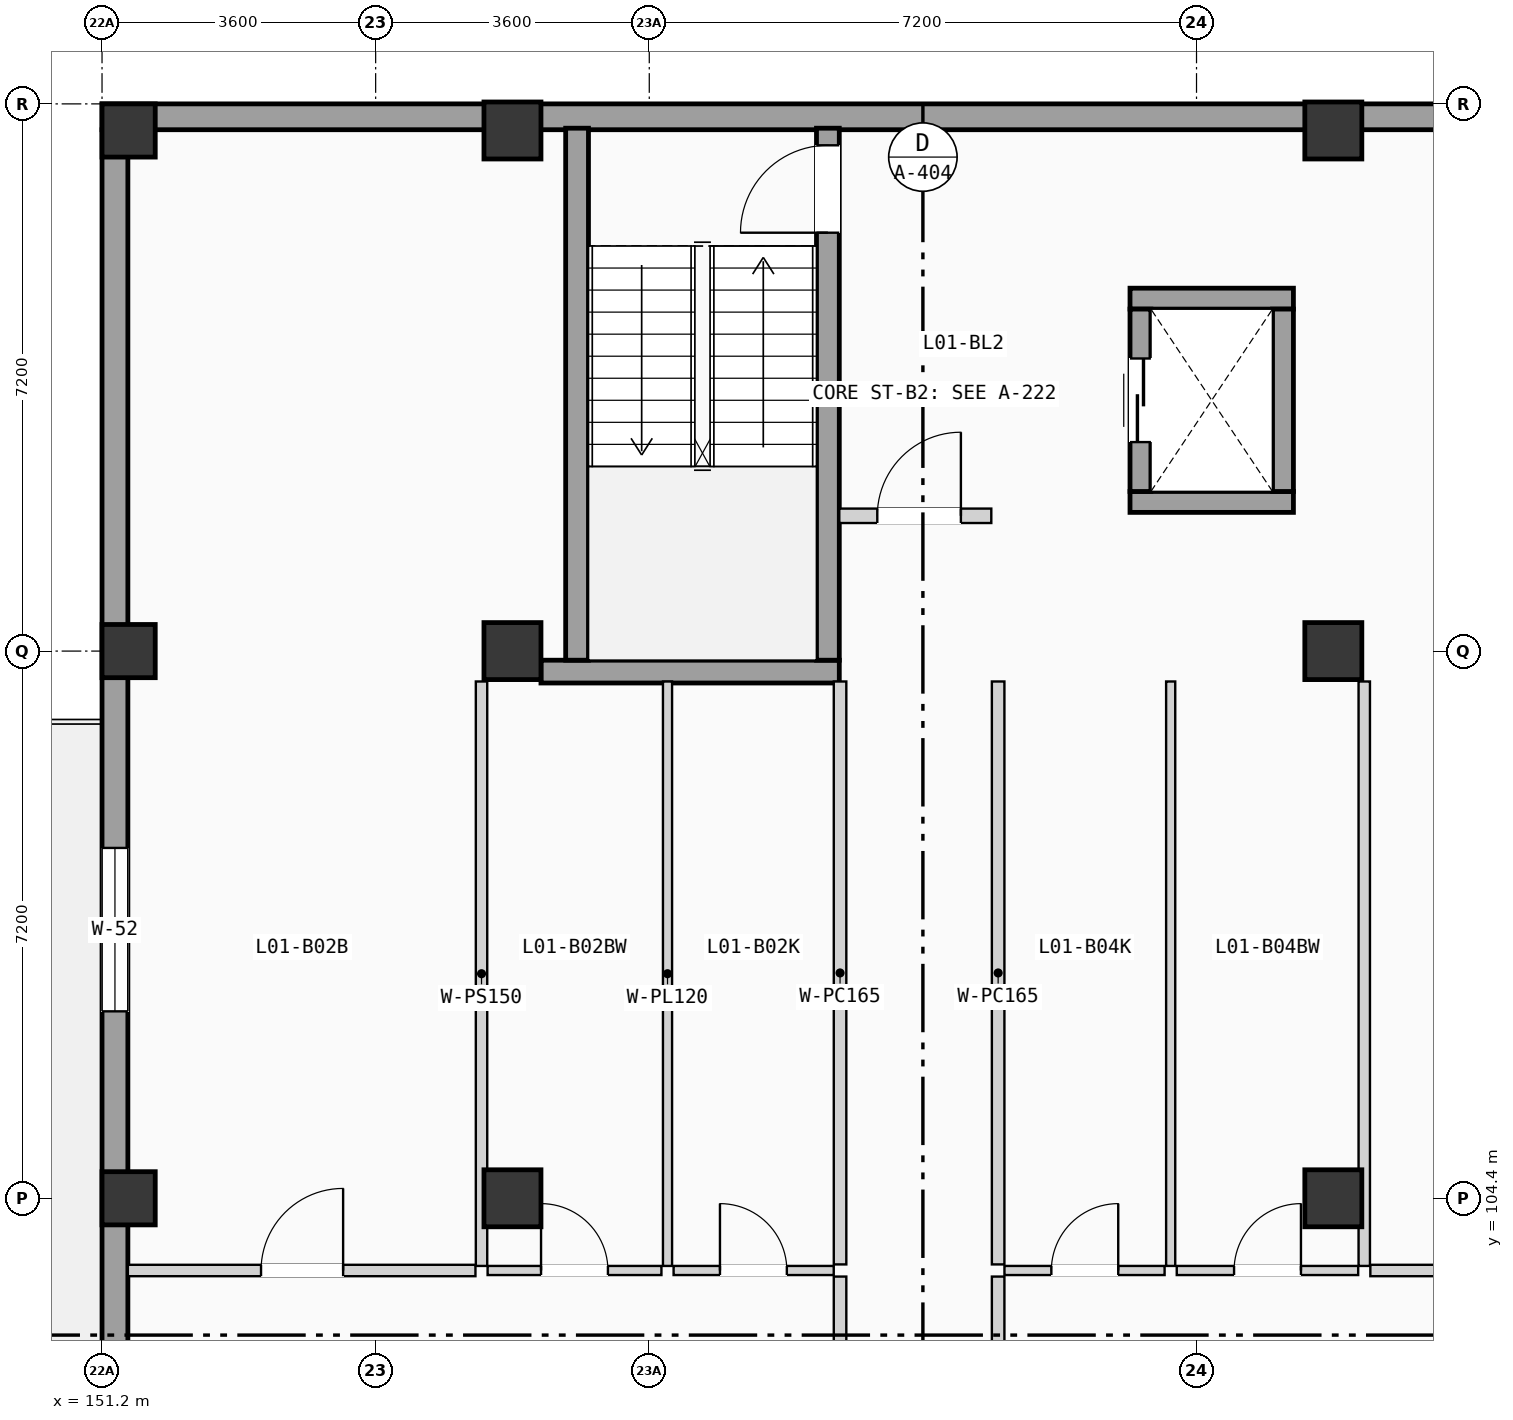
"""IFC4 building model, lengths in metres.
Left out: names, types, materials, properties, quantities, classifications, styles, units other than length and angle.
Written with IfcOpenShell. Run it as: python <this file> out.ifc"""

import sys

from ifc_helpers import new_model, si_unit, direction, frame, frame_2d, origin, origin_2d, place, context, subcontext, project, spatial, rectangle, extrude, element, fill, save


model = new_model("IFC4")
c1 = context("Model", 3, precision=1e-05, world=origin(), true_north=direction((0.0, 1.0)))
c2 = subcontext(c1, "Body", "Model", "MODEL_VIEW")
j1 = project(units=[si_unit("LENGTHUNIT", "METRE"), si_unit("PLANEANGLEUNIT", "RADIAN")], contexts=[c1])
p1 = place(None, origin())
s1 = spatial("IfcSite", under=j1, at=p1, CompositionType="ELEMENT")
p2 = place(p1, origin())
s2 = spatial("IfcBuilding", under=s1, at=p2, CompositionType="ELEMENT")
p3 = place(p2, frame((0.0, 0.0, 4.9)))
s3 = spatial("IfcBuildingStorey", under=s2, at=p3, CompositionType="ELEMENT", Elevation=4.9)
for number, where, z_axis, x_axis in (
    (1, (151.55, 104.4, 0.0), (0.0, 0.0, 1.0), (1.0, 0.0, 0.0)),
    (2, (151.55, 111.6, 0.0), (0.0, 0.0, 1.0), (1.0, 0.0, 0.0)),
    (3, (151.55, 118.45, 0.0), (0.0, 0.0, 1.0), (1.0, 0.0, 0.0)),
):
    element("IfcColumn", number, at=place(p3, frame(where, z_axis=z_axis, x_axis=x_axis)), inside=s3, PredefinedType="COLUMN", context=c2, shape_type="SweptSolid", body=[
        extrude(rectangle(XDim=0.7, YDim=0.7, at=origin_2d()), origin(), (0.0, 0.0, 1.0), 3.675),
    ])
for number, where, z_axis, x_axis in (
    (4, (156.6, 104.4, 0.0), (0.0, 0.0, 1.0), (1.0, 0.0, 0.0)),
    (5, (156.6, 111.6, 0.0), (0.0, 0.0, 1.0), (1.0, 0.0, 0.0)),
    (6, (156.6, 118.45, 0.0), (0.0, 0.0, 1.0), (1.0, 0.0, 0.0)),
    (7, (167.4, 104.4, 0.0), (0.0, 0.0, 1.0), (1.0, 0.0, 0.0)),
    (8, (167.4, 111.6, 0.0), (0.0, 0.0, 1.0), (1.0, 0.0, 0.0)),
    (9, (167.4, 118.45, 0.0), (0.0, 0.0, 1.0), (1.0, 0.0, 0.0)),
):
    element("IfcColumn", number, at=place(p3, frame(where, z_axis=z_axis, x_axis=x_axis)), inside=s3, PredefinedType="COLUMN", context=c2, shape_type="SweptSolid", body=[
        extrude(rectangle(XDim=0.75, YDim=0.75, at=origin_2d()), origin(), (0.0, 0.0, 1.0), 3.675),
    ])
p4 = place(p3, frame((151.2, 118.63, 0.0), z_axis=(0.0, 0.0, 1.0), x_axis=(1.0, 0.0, 0.0)))
e10 = element("IfcWall", 10, at=p4, inside=s3, PredefinedType="SOLIDWALL", context=c2, shape_type="SweptSolid", body=[
    extrude(rectangle(XDim=21.6, YDim=0.34, at=frame_2d((10.8, 0.0))), origin(), (0.0, 0.0, 1.0), 3.415),
])
p5 = place(p3, frame((151.37, 68.74, 0.0), z_axis=(0.0, 0.0, 1.0), x_axis=(0.0, 1.0, 0.0)))
e11 = element("IfcWall", 11, at=p5, inside=s3, PredefinedType="SOLIDWALL", context=c2, shape_type="SweptSolid", body=[
    extrude(rectangle(XDim=49.72, YDim=0.34, at=frame_2d((24.86, 0.0))), origin(), (0.0, 0.0, 1.0), 3.415),
])
p6 = place(p5, frame((15.765, 0.0, 0.0)))
e12 = element("IfcOpeningElement", 12, at=p6, cuts=e11, PredefinedType="OPENING", context=c2, shape_type="SweptSolid", body=[
    extrude(rectangle(XDim=0.95, YDim=2.15, at=frame_2d((0.475, 1.075))), frame((0.0, 0.18, 0.0), z_axis=(0.0, -1.0, 0.0), x_axis=(1.0, 0.0, 0.0)), (0.0, 0.0, 1.0), 0.36),
])
p7 = place(p5, frame((8.498, 0.0, 0.9)))
e13 = element("IfcOpeningElement", 13, at=p7, cuts=e11, PredefinedType="OPENING", context=c2, shape_type="SweptSolid", body=[
    extrude(rectangle(XDim=2.0, YDim=1.65, at=frame_2d((1.0, 0.825))), frame((0.0, 0.18, 0.0), z_axis=(0.0, -1.0, 0.0), x_axis=(1.0, 0.0, 0.0)), (0.0, 0.0, 1.0), 0.36),
])
p8 = place(p5, frame((18.235, 0.0, 0.9)))
e14 = element("IfcOpeningElement", 14, at=p8, cuts=e11, PredefinedType="OPENING", context=c2, shape_type="SweptSolid", body=[
    extrude(rectangle(XDim=2.0, YDim=1.8, at=frame_2d((1.0, 0.9))), frame((0.0, 0.18, 0.0), z_axis=(0.0, -1.0, 0.0), x_axis=(1.0, 0.0, 0.0)), (0.0, 0.0, 1.0), 0.36),
])
p9 = place(p5, frame((32.345, 0.0, 0.0)))
e15 = element("IfcOpeningElement", 15, at=p9, cuts=e11, PredefinedType="OPENING", context=c2, shape_type="SweptSolid", body=[
    extrude(rectangle(XDim=1.08, YDim=2.18, at=frame_2d((0.54, 1.09))), frame((0.0, 0.18, 0.0), z_axis=(0.0, -1.0, 0.0), x_axis=(1.0, 0.0, 0.0)), (0.0, 0.0, 1.0), 0.36),
])
p10 = place(p5, frame((24.087, 0.0, 0.9)))
e16 = element("IfcOpeningElement", 16, at=p10, cuts=e11, PredefinedType="OPENING", context=c2, shape_type="SweptSolid", body=[
    extrude(rectangle(XDim=2.15, YDim=1.2, at=frame_2d((1.075, 0.6))), frame((0.0, 0.18, 0.0), z_axis=(0.0, -1.0, 0.0), x_axis=(1.0, 0.0, 0.0)), (0.0, 0.0, 1.0), 0.36),
])
p11 = place(p5, frame((38.12, 0.0, 0.9)))
e17 = element("IfcOpeningElement", 17, at=p11, cuts=e11, PredefinedType="OPENING", context=c2, shape_type="SweptSolid", body=[
    extrude(rectangle(XDim=2.15, YDim=1.35, at=frame_2d((1.075, 0.675))), frame((0.0, 0.18, 0.0), z_axis=(0.0, -1.0, 0.0), x_axis=(1.0, 0.0, 0.0)), (0.0, 0.0, 1.0), 0.36),
])
p12 = place(p3, frame((156.975, 111.33, 0.0), z_axis=(0.0, 0.0, 1.0), x_axis=(1.0, 0.0, 0.0)))
e18 = element("IfcWall", 18, at=p12, inside=s3, PredefinedType="SHEAR", context=c2, shape_type="SweptSolid", body=[
    extrude(rectangle(XDim=3.925, YDim=0.3, at=frame_2d((1.962, 0.0))), origin(), (0.0, 0.0, 1.0), 3.415),
])
p13 = place(p3, frame((157.45, 111.48, 0.0), z_axis=(0.0, 0.0, 1.0), x_axis=(0.0, 1.0, 0.0)))
e19 = element("IfcWall", 19, at=p13, inside=s3, PredefinedType="SHEAR", context=c2, shape_type="SweptSolid", body=[
    extrude(rectangle(XDim=7.0, YDim=0.3, at=frame_2d((3.5, 0.0))), origin(), (0.0, 0.0, 1.0), 3.415),
])
p14 = place(p3, frame((160.75, 111.48, 0.0), z_axis=(0.0, 0.0, 1.0), x_axis=(0.0, 1.0, 0.0)))
e20 = element("IfcWall", 20, at=p14, inside=s3, PredefinedType="SHEAR", context=c2, shape_type="SweptSolid", body=[
    extrude(rectangle(XDim=7.0, YDim=0.3, at=frame_2d((3.5, 0.0))), origin(), (0.0, 0.0, 1.0), 3.415),
])
p15 = place(p14, frame((5.625, 0.0, 0.0)))
e21 = element("IfcOpeningElement", 21, at=p15, cuts=e20, PredefinedType="OPENING", context=c2, shape_type="SweptSolid", body=[
    extrude(rectangle(XDim=1.15, YDim=2.12, at=frame_2d((0.575, 1.06))), frame((0.0, 0.16, 0.0), z_axis=(0.0, -1.0, 0.0), x_axis=(1.0, 0.0, 0.0)), (0.0, 0.0, 1.0), 0.32),
])
for number, where, z_axis, x_axis in (
    (22, (164.725, 113.562, 0.0), (0.0, 0.0, 1.0), (1.0, 0.0, 0.0)),
    (23, (164.725, 116.238, 0.0), (0.0, 0.0, 1.0), (1.0, 0.0, 0.0)),
):
    element("IfcWall", number, at=place(p3, frame(where, z_axis=z_axis, x_axis=x_axis)), inside=s3, PredefinedType="SHEAR", context=c2, shape_type="SweptSolid", body=[
        extrude(rectangle(XDim=2.15, YDim=0.275, at=frame_2d((1.075, 0.0))), origin(), (0.0, 0.0, 1.0), 3.415),
    ])
p16 = place(p3, frame((164.863, 113.7, 0.0), z_axis=(0.0, 0.0, 1.0), x_axis=(0.0, 1.0, 0.0)))
e24 = element("IfcWall", 24, at=p16, inside=s3, PredefinedType="SHEAR", context=c2, shape_type="SweptSolid", body=[
    extrude(rectangle(XDim=2.4, YDim=0.275, at=frame_2d((1.2, 0.0))), origin(), (0.0, 0.0, 1.0), 3.415),
])
p17 = place(p16, frame((0.65, 0.0, 0.0)))
e25 = element("IfcOpeningElement", 25, at=p17, cuts=e24, PredefinedType="OPENING", context=c2, shape_type="SweptSolid", body=[
    extrude(rectangle(XDim=1.1, YDim=2.15, at=frame_2d((0.55, 1.075))), frame((0.0, 0.147, 0.0), z_axis=(0.0, -1.0, 0.0), x_axis=(1.0, 0.0, 0.0)), (0.0, 0.0, 1.0), 0.295),
])
p18 = place(p3, frame((166.738, 113.7, 0.0), z_axis=(0.0, 0.0, 1.0), x_axis=(0.0, 1.0, 0.0)))
e26 = element("IfcWall", 26, at=p18, inside=s3, PredefinedType="SHEAR", context=c2, shape_type="SweptSolid", body=[
    extrude(rectangle(XDim=2.4, YDim=0.275, at=frame_2d((1.2, 0.0))), origin(), (0.0, 0.0, 1.0), 3.415),
])
p19 = place(p3, frame((160.9, 113.38, 0.0), z_axis=(0.0, 0.0, 1.0), x_axis=(1.0, 0.0, 0.0)))
e27 = element("IfcWall", 27, at=p19, inside=s3, PredefinedType="PARTITIONING", context=c2, shape_type="SweptSolid", body=[
    extrude(rectangle(XDim=2.0, YDim=0.19, at=frame_2d((1.0, 0.0))), origin(), (0.0, 0.0, 1.0), 3.395),
])
p20 = place(p19, frame((0.5, 0.0, 0.0)))
e28 = element("IfcOpeningElement", 28, at=p20, cuts=e27, PredefinedType="OPENING", context=c2, shape_type="SweptSolid", body=[
    extrude(rectangle(XDim=1.1, YDim=2.12, at=frame_2d((0.55, 1.06))), frame((0.0, 0.105, 0.0), z_axis=(0.0, -1.0, 0.0), x_axis=(1.0, 0.0, 0.0)), (0.0, 0.0, 1.0), 0.21),
])
p21 = place(p3, frame((160.91, 98.23, 0.0), z_axis=(0.0, 0.0, 1.0), x_axis=(0.0, 1.0, 0.0)))
e29 = element("IfcWall", 29, at=p21, inside=s3, PredefinedType="PARTITIONING", context=c2, shape_type="SweptSolid", body=[
    extrude(rectangle(XDim=5.14, YDim=0.165, at=frame_2d((2.57, 0.0))), origin(), (0.0, 0.0, 1.0), 3.395),
])
p22 = place(p21, frame((2.065, 0.0, 0.0)))
e30 = element("IfcOpeningElement", 30, at=p22, cuts=e29, PredefinedType="OPENING", context=c2, shape_type="SweptSolid", body=[
    extrude(rectangle(XDim=1.01, YDim=2.11, at=frame_2d((0.505, 1.055))), frame((0.0, 0.093, 0.0), z_axis=(0.0, -1.0, 0.0), x_axis=(1.0, 0.0, 0.0)), (0.0, 0.0, 1.0), 0.185),
])
p23 = place(p3, frame((160.91, 103.53, 0.0), z_axis=(0.0, 0.0, 1.0), x_axis=(0.0, 1.0, 0.0)))
e31 = element("IfcWall", 31, at=p23, inside=s3, PredefinedType="PARTITIONING", context=c2, shape_type="SweptSolid", body=[
    extrude(rectangle(XDim=7.67, YDim=0.165, at=frame_2d((3.835, 0.0))), origin(), (0.0, 0.0, 1.0), 3.395),
])
p24 = place(p3, frame((162.99, 98.23, 0.0), z_axis=(0.0, 0.0, 1.0), x_axis=(0.0, 1.0, 0.0)))
e32 = element("IfcWall", 32, at=p24, inside=s3, PredefinedType="PARTITIONING", context=c2, shape_type="SweptSolid", body=[
    extrude(rectangle(XDim=5.14, YDim=0.165, at=frame_2d((2.57, 0.0))), origin(), (0.0, 0.0, 1.0), 3.395),
])
p25 = place(p24, frame((2.065, 0.0, 0.0)))
e33 = element("IfcOpeningElement", 33, at=p25, cuts=e32, PredefinedType="OPENING", context=c2, shape_type="SweptSolid", body=[
    extrude(rectangle(XDim=1.01, YDim=2.11, at=frame_2d((0.505, 1.055))), frame((0.0, 0.093, 0.0), z_axis=(0.0, -1.0, 0.0), x_axis=(1.0, 0.0, 0.0)), (0.0, 0.0, 1.0), 0.185),
])
p26 = place(p3, frame((162.99, 103.53, 0.0), z_axis=(0.0, 0.0, 1.0), x_axis=(0.0, 1.0, 0.0)))
e34 = element("IfcWall", 34, at=p26, inside=s3, PredefinedType="PARTITIONING", context=c2, shape_type="SweptSolid", body=[
    extrude(rectangle(XDim=7.67, YDim=0.165, at=frame_2d((3.835, 0.0))), origin(), (0.0, 0.0, 1.0), 3.395),
])
p27 = place(p3, frame((158.72, 103.45, 0.0), z_axis=(0.0, 0.0, 1.0), x_axis=(1.0, 0.0, 0.0)))
e35 = element("IfcWall", 35, at=p27, inside=s3, PredefinedType="PARTITIONING", context=c2, shape_type="SweptSolid", body=[
    extrude(rectangle(XDim=2.107, YDim=0.12, at=frame_2d((1.053, 0.0))), origin(), (0.0, 0.0, 1.0), 3.395),
])
p28 = place(p27, frame((0.61, 0.0, 0.0)))
e36 = element("IfcOpeningElement", 36, at=p28, cuts=e35, PredefinedType="OPENING", context=c2, shape_type="SweptSolid", body=[
    extrude(rectangle(XDim=0.88, YDim=2.02, at=frame_2d((0.44, 1.01))), frame((0.0, 0.07, 0.0), z_axis=(0.0, -1.0, 0.0), x_axis=(1.0, 0.0, 0.0)), (0.0, 0.0, 1.0), 0.14),
])
p29 = place(p3, frame((151.54, 103.45, 0.0), z_axis=(0.0, 0.0, 1.0), x_axis=(1.0, 0.0, 0.0)))
e37 = element("IfcWall", 37, at=p29, inside=s3, PredefinedType="PARTITIONING", context=c2, shape_type="SweptSolid", body=[
    extrude(rectangle(XDim=4.573, YDim=0.15, at=frame_2d((2.287, 0.0))), origin(), (0.0, 0.0, 1.0), 3.395),
])
p30 = place(p29, frame((1.752, 0.0, 0.0)))
e38 = element("IfcOpeningElement", 38, at=p30, cuts=e37, PredefinedType="OPENING", context=c2, shape_type="SweptSolid", body=[
    extrude(rectangle(XDim=1.08, YDim=2.1, at=frame_2d((0.54, 1.05))), frame((0.0, 0.085, 0.0), z_axis=(0.0, -1.0, 0.0), x_axis=(1.0, 0.0, 0.0)), (0.0, 0.0, 1.0), 0.17),
])
p31 = place(p3, frame((156.273, 103.45, 0.0), z_axis=(0.0, 0.0, 1.0), x_axis=(1.0, 0.0, 0.0)))
e39 = element("IfcWall", 39, at=p31, inside=s3, PredefinedType="PARTITIONING", context=c2, shape_type="SweptSolid", body=[
    extrude(rectangle(XDim=2.287, YDim=0.12, at=frame_2d((1.144, 0.0))), origin(), (0.0, 0.0, 1.0), 3.395),
])
p32 = place(p31, frame((0.703, 0.0, 0.0)))
e40 = element("IfcOpeningElement", 40, at=p32, cuts=e39, PredefinedType="OPENING", context=c2, shape_type="SweptSolid", body=[
    extrude(rectangle(XDim=0.88, YDim=2.02, at=frame_2d((0.44, 1.01))), frame((0.0, 0.07, 0.0), z_axis=(0.0, -1.0, 0.0), x_axis=(1.0, 0.0, 0.0)), (0.0, 0.0, 1.0), 0.14),
])
p33 = place(p3, frame((158.64, 103.51, 0.0), z_axis=(0.0, 0.0, 1.0), x_axis=(0.0, 1.0, 0.0)))
e41 = element("IfcWall", 41, at=p33, inside=s3, PredefinedType="PARTITIONING", context=c2, shape_type="SweptSolid", body=[
    extrude(rectangle(XDim=7.69, YDim=0.12, at=frame_2d((3.845, 0.0))), origin(), (0.0, 0.0, 1.0), 3.395),
])
p34 = place(p3, frame((156.193, 103.51, 0.0), z_axis=(0.0, 0.0, 1.0), x_axis=(0.0, 1.0, 0.0)))
e42 = element("IfcWall", 42, at=p34, inside=s3, PredefinedType="PARTITIONING", context=c2, shape_type="SweptSolid", body=[
    extrude(rectangle(XDim=7.69, YDim=0.15, at=frame_2d((3.845, 0.0))), origin(), (0.0, 0.0, 1.0), 3.395),
])
p35 = place(p3, frame((163.073, 103.45, 0.0), z_axis=(0.0, 0.0, 1.0), x_axis=(1.0, 0.0, 0.0)))
e43 = element("IfcWall", 43, at=p35, inside=s3, PredefinedType="PARTITIONING", context=c2, shape_type="SweptSolid", body=[
    extrude(rectangle(XDim=2.107, YDim=0.12, at=frame_2d((1.053, 0.0))), origin(), (0.0, 0.0, 1.0), 3.395),
])
p36 = place(p35, frame((0.617, 0.0, 0.0)))
e44 = element("IfcOpeningElement", 44, at=p36, cuts=e43, PredefinedType="OPENING", context=c2, shape_type="SweptSolid", body=[
    extrude(rectangle(XDim=0.88, YDim=2.02, at=frame_2d((0.44, 1.01))), frame((0.0, 0.07, 0.0), z_axis=(0.0, -1.0, 0.0), x_axis=(1.0, 0.0, 0.0)), (0.0, 0.0, 1.0), 0.14),
])
p37 = place(p3, frame((167.887, 103.45, 0.0), z_axis=(0.0, 0.0, 1.0), x_axis=(1.0, 0.0, 0.0)))
e45 = element("IfcWall", 45, at=p37, inside=s3, PredefinedType="PARTITIONING", context=c2, shape_type="SweptSolid", body=[
    extrude(rectangle(XDim=4.573, YDim=0.15, at=frame_2d((2.287, 0.0))), origin(), (0.0, 0.0, 1.0), 3.395),
])
p38 = place(p37, frame((1.761, 0.0, 0.0)))
e46 = element("IfcOpeningElement", 46, at=p38, cuts=e45, PredefinedType="OPENING", context=c2, shape_type="SweptSolid", body=[
    extrude(rectangle(XDim=1.04, YDim=2.08, at=frame_2d((0.52, 1.04))), frame((0.0, 0.085, 0.0), z_axis=(0.0, -1.0, 0.0), x_axis=(1.0, 0.0, 0.0)), (0.0, 0.0, 1.0), 0.17),
])
p39 = place(p3, frame((165.34, 103.45, 0.0), z_axis=(0.0, 0.0, 1.0), x_axis=(1.0, 0.0, 0.0)))
e47 = element("IfcWall", 47, at=p39, inside=s3, PredefinedType="PARTITIONING", context=c2, shape_type="SweptSolid", body=[
    extrude(rectangle(XDim=2.387, YDim=0.12, at=frame_2d((1.193, 0.0))), origin(), (0.0, 0.0, 1.0), 3.395),
])
p40 = place(p39, frame((0.754, 0.0, 0.0)))
e48 = element("IfcOpeningElement", 48, at=p40, cuts=e47, PredefinedType="OPENING", context=c2, shape_type="SweptSolid", body=[
    extrude(rectangle(XDim=0.88, YDim=2.02, at=frame_2d((0.44, 1.01))), frame((0.0, 0.07, 0.0), z_axis=(0.0, -1.0, 0.0), x_axis=(1.0, 0.0, 0.0)), (0.0, 0.0, 1.0), 0.14),
])
p41 = place(p3, frame((165.26, 103.51, 0.0), z_axis=(0.0, 0.0, 1.0), x_axis=(0.0, 1.0, 0.0)))
e49 = element("IfcWall", 49, at=p41, inside=s3, PredefinedType="PARTITIONING", context=c2, shape_type="SweptSolid", body=[
    extrude(rectangle(XDim=7.69, YDim=0.12, at=frame_2d((3.845, 0.0))), origin(), (0.0, 0.0, 1.0), 3.395),
])
p42 = place(p3, frame((167.807, 103.51, 0.0), z_axis=(0.0, 0.0, 1.0), x_axis=(0.0, 1.0, 0.0)))
e50 = element("IfcWall", 50, at=p42, inside=s3, PredefinedType="PARTITIONING", context=c2, shape_type="SweptSolid", body=[
    extrude(rectangle(XDim=7.69, YDim=0.15, at=frame_2d((3.845, 0.0))), origin(), (0.0, 0.0, 1.0), 3.395),
])
p43 = place(p11, origin())
e51 = element("IfcWindow", 51, at=p43, inside=s3, PartitioningType="DOUBLE_PANEL_VERTICAL", PredefinedType="WINDOW", context=c2, shape_type="SweptSolid", body=[
    extrude(rectangle(XDim=2.15, YDim=1.35, at=frame_2d((1.075, 0.675))), frame((0.0, 0.03, 0.0), z_axis=(0.0, -1.0, 0.0), x_axis=(1.0, 0.0, 0.0)), (0.0, 0.0, 1.0), 0.06),
])
fill(e17, e51)
p44 = place(p15, origin())
e52 = element("IfcDoor", 52, at=p44, inside=s3, OperationType="SINGLE_SWING_LEFT", PredefinedType="DOOR", context=c2, shape_type="SweptSolid", body=[
    extrude(rectangle(XDim=1.15, YDim=2.12, at=frame_2d((0.575, 1.06))), frame((0.0, 0.025, 0.0), z_axis=(0.0, -1.0, 0.0), x_axis=(1.0, 0.0, 0.0)), (0.0, 0.0, 1.0), 0.05),
])
fill(e21, e52)
p45 = place(p17, origin())
e53 = element("IfcDoor", 53, at=p45, inside=s3, OperationType="SLIDING_TO_LEFT", PredefinedType="DOOR", context=c2, shape_type="SweptSolid", body=[
    extrude(rectangle(XDim=1.1, YDim=2.15, at=frame_2d((0.55, 1.075))), frame((0.0, 0.025, 0.0), z_axis=(0.0, -1.0, 0.0), x_axis=(1.0, 0.0, 0.0)), (0.0, 0.0, 1.0), 0.05),
])
fill(e25, e53)
p46 = place(p20, origin())
e54 = element("IfcDoor", 54, at=p46, inside=s3, OperationType="SINGLE_SWING_RIGHT", PredefinedType="DOOR", context=c2, shape_type="SweptSolid", body=[
    extrude(rectangle(XDim=1.1, YDim=2.12, at=frame_2d((0.55, 1.06))), frame((0.0, 0.025, 0.0), z_axis=(0.0, -1.0, 0.0), x_axis=(1.0, 0.0, 0.0)), (0.0, 0.0, 1.0), 0.05),
])
fill(e28, e54)
p47 = place(p28, origin())
e55 = element("IfcDoor", 55, at=p47, inside=s3, OperationType="SINGLE_SWING_LEFT", PredefinedType="DOOR", context=c2, shape_type="SweptSolid", body=[
    extrude(rectangle(XDim=0.88, YDim=2.02, at=frame_2d((0.44, 1.01))), frame((0.0, 0.025, 0.0), z_axis=(0.0, -1.0, 0.0), x_axis=(1.0, 0.0, 0.0)), (0.0, 0.0, 1.0), 0.05),
])
fill(e36, e55)
p48 = place(p30, origin())
e56 = element("IfcDoor", 56, at=p48, inside=s3, OperationType="SINGLE_SWING_RIGHT", PredefinedType="DOOR", context=c2, shape_type="SweptSolid", body=[
    extrude(rectangle(XDim=1.08, YDim=2.1, at=frame_2d((0.54, 1.05))), frame((0.0, 0.025, 0.0), z_axis=(0.0, -1.0, 0.0), x_axis=(1.0, 0.0, 0.0)), (0.0, 0.0, 1.0), 0.05),
])
fill(e38, e56)
p49 = place(p32, origin())
e57 = element("IfcDoor", 57, at=p49, inside=s3, OperationType="SINGLE_SWING_LEFT", PredefinedType="DOOR", context=c2, shape_type="SweptSolid", body=[
    extrude(rectangle(XDim=0.88, YDim=2.02, at=frame_2d((0.44, 1.01))), frame((0.0, 0.025, 0.0), z_axis=(0.0, -1.0, 0.0), x_axis=(1.0, 0.0, 0.0)), (0.0, 0.0, 1.0), 0.05),
])
fill(e40, e57)
p50 = place(p36, origin())
e58 = element("IfcDoor", 58, at=p50, inside=s3, OperationType="SINGLE_SWING_RIGHT", PredefinedType="DOOR", context=c2, shape_type="SweptSolid", body=[
    extrude(rectangle(XDim=0.88, YDim=2.02, at=frame_2d((0.44, 1.01))), frame((0.0, 0.025, 0.0), z_axis=(0.0, -1.0, 0.0), x_axis=(1.0, 0.0, 0.0)), (0.0, 0.0, 1.0), 0.05),
])
fill(e44, e58)
p51 = place(p40, origin())
e59 = element("IfcDoor", 59, at=p51, inside=s3, OperationType="SINGLE_SWING_RIGHT", PredefinedType="DOOR", context=c2, shape_type="SweptSolid", body=[
    extrude(rectangle(XDim=0.88, YDim=2.02, at=frame_2d((0.44, 1.01))), frame((0.0, 0.025, 0.0), z_axis=(0.0, -1.0, 0.0), x_axis=(1.0, 0.0, 0.0)), (0.0, 0.0, 1.0), 0.05),
])
fill(e48, e59)
save(model, sys.argv[1])
